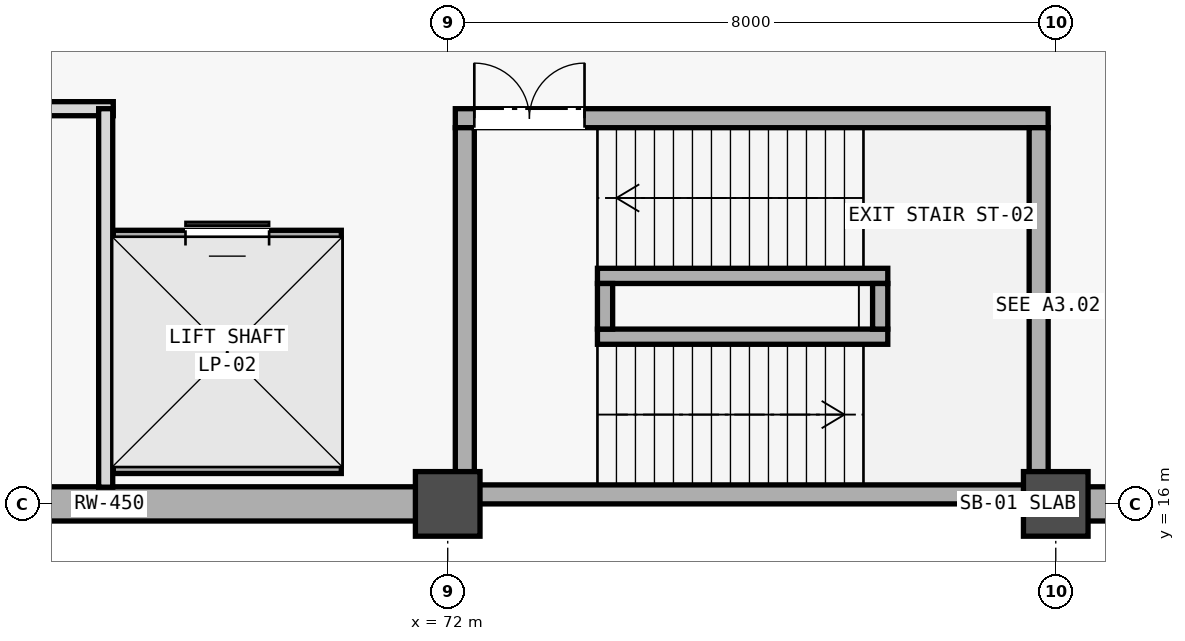
"""IFC4 building model, lengths in metres.
Left out: names, types, materials, properties, quantities, classifications, styles, units other than length and angle.
Written with IfcOpenShell. Run it as: python <this file> out.ifc"""

import sys

from ifc_helpers import new_model, si_unit, direction, frame, frame_2d, origin, origin_2d, place, context, subcontext, project, spatial, rectangle, extrude, element, fill, save


model = new_model("IFC4")
c1 = context("Model", 3, precision=1e-05, world=origin(), true_north=direction((0.0, 1.0)))
c2 = subcontext(c1, "Body", "Model", "MODEL_VIEW")
j1 = project(units=[si_unit("LENGTHUNIT", "METRE"), si_unit("PLANEANGLEUNIT", "RADIAN")], contexts=[c1])
p1 = place(None, origin())
s1 = spatial("IfcSite", under=j1, at=p1, CompositionType="ELEMENT")
p2 = place(p1, origin())
s2 = spatial("IfcBuilding", under=s1, at=p2, CompositionType="ELEMENT")
p3 = place(p2, frame((0.0, 0.0, -4.8)))
s3 = spatial("IfcBuildingStorey", under=s2, at=p3, CompositionType="ELEMENT", Elevation=-4.8)
for number, where, z_axis, x_axis in (
    (1, (72.0, 16.0, 0.0), (0.0, 0.0, 1.0), (1.0, 0.0, 0.0)),
    (2, (80.0, 16.0, 0.0), (0.0, 0.0, 1.0), (1.0, 0.0, 0.0)),
):
    element("IfcColumn", number, at=place(p3, frame(where, z_axis=z_axis, x_axis=x_axis)), inside=s3, PredefinedType="COLUMN", context=c2, shape_type="SweptSolid", body=[
        extrude(rectangle(XDim=0.85, YDim=0.85, at=origin_2d()), origin(), (0.0, 0.0, 1.0), 4.47),
    ])
p4 = place(p3, frame((31.902, 16.0, 0.0), z_axis=(0.0, 0.0, 1.0), x_axis=(1.0, 0.0, 0.0)))
e3 = element("IfcWall", 3, at=p4, inside=s3, PredefinedType="SOLIDWALL", context=c2, shape_type="SweptSolid", body=[
    extrude(rectangle(XDim=40.196, YDim=0.45, at=frame_2d((20.098, 0.0))), origin(), (0.0, 0.0, 1.0), 4.47),
])
p5 = place(p3, frame((79.902, 16.0, 0.0), z_axis=(0.0, 0.0, 1.0), x_axis=(1.0, 0.0, 0.0)))
e4 = element("IfcWall", 4, at=p5, inside=s3, PredefinedType="SOLIDWALL", context=c2, shape_type="SweptSolid", body=[
    extrude(rectangle(XDim=16.098, YDim=0.45, at=frame_2d((8.049, 0.0))), origin(), (0.0, 0.0, 1.0), 4.47),
])
p6 = place(p3, frame((72.1, 16.125, 0.0), z_axis=(0.0, 0.0, 1.0), x_axis=(1.0, 0.0, 0.0)))
e5 = element("IfcWall", 5, at=p6, inside=s3, PredefinedType="SHEAR", context=c2, shape_type="SweptSolid", body=[
    extrude(rectangle(XDim=7.8, YDim=0.25, at=frame_2d((3.9, 0.0))), origin(), (0.0, 0.0, 1.0), 4.8),
])
p7 = place(p3, frame((72.1, 21.075, 0.0), z_axis=(0.0, 0.0, 1.0), x_axis=(1.0, 0.0, 0.0)))
e6 = element("IfcWall", 6, at=p7, inside=s3, PredefinedType="SHEAR", context=c2, shape_type="SweptSolid", body=[
    extrude(rectangle(XDim=7.8, YDim=0.25, at=frame_2d((3.9, 0.0))), origin(), (0.0, 0.0, 1.0), 4.8),
])
p8 = place(p7, frame((0.25, 0.0, 0.0)))
e7 = element("IfcOpeningElement", 7, at=p8, cuts=e6, PredefinedType="OPENING", context=c2, shape_type="SweptSolid", body=[
    extrude(rectangle(XDim=1.45, YDim=2.2, at=frame_2d((0.725, 1.1))), frame((0.0, 0.135, 0.0), z_axis=(0.0, -1.0, 0.0), x_axis=(1.0, 0.0, 0.0)), (0.0, 0.0, 1.0), 0.27),
])
for number, where, z_axis, x_axis in (
    (8, (72.225, 16.25, 0.0), (0.0, 0.0, 1.0), (0.0, 1.0, 0.0)),
    (9, (79.775, 16.25, 0.0), (0.0, 0.0, 1.0), (0.0, 1.0, 0.0)),
):
    element("IfcWall", number, at=place(p3, frame(where, z_axis=z_axis, x_axis=x_axis)), inside=s3, PredefinedType="SHEAR", context=c2, shape_type="SweptSolid", body=[
        extrude(rectangle(XDim=4.7, YDim=0.25, at=frame_2d((2.35, 0.0))), origin(), (0.0, 0.0, 1.0), 4.8),
    ])
for number, where, z_axis, x_axis in (
    (10, (73.97, 18.2, 0.0), (0.0, 0.0, 1.0), (1.0, 0.0, 0.0)),
    (11, (73.97, 19.0, 0.0), (0.0, 0.0, 1.0), (1.0, 0.0, 0.0)),
):
    element("IfcWall", number, at=place(p3, frame(where, z_axis=z_axis, x_axis=x_axis)), inside=s3, PredefinedType="SHEAR", context=c2, shape_type="SweptSolid", body=[
        extrude(rectangle(XDim=3.82, YDim=0.2, at=frame_2d((1.91, 0.0))), origin(), (0.0, 0.0, 1.0), 4.8),
    ])
for number, where, z_axis, x_axis in (
    (12, (74.07, 18.3, 0.0), (0.0, 0.0, 1.0), (0.0, 1.0, 0.0)),
    (13, (77.69, 18.3, 0.0), (0.0, 0.0, 1.0), (0.0, 1.0, 0.0)),
):
    element("IfcWall", number, at=place(p3, frame(where, z_axis=z_axis, x_axis=x_axis)), inside=s3, PredefinedType="SHEAR", context=c2, shape_type="SweptSolid", body=[
        extrude(rectangle(XDim=0.6, YDim=0.2, at=frame_2d((0.3, 0.0))), origin(), (0.0, 0.0, 1.0), 4.8),
    ])
p9 = place(p3, frame((67.6, 16.5, 0.0), z_axis=(0.0, 0.0, 1.0), x_axis=(1.0, 0.0, 0.0)))
e14 = element("IfcWall", 14, at=p9, inside=s3, PredefinedType="SHEAR", context=c2, shape_type="SweptSolid", body=[
    extrude(rectangle(XDim=3.0, YDim=0.2, at=frame_2d((1.5, 0.0))), origin(), (0.0, 0.0, 1.0), 4.8),
])
p10 = place(p3, frame((67.6, 19.5, 0.0), z_axis=(0.0, 0.0, 1.0), x_axis=(1.0, 0.0, 0.0)))
e15 = element("IfcWall", 15, at=p10, inside=s3, PredefinedType="SHEAR", context=c2, shape_type="SweptSolid", body=[
    extrude(rectangle(XDim=3.0, YDim=0.2, at=frame_2d((1.5, 0.0))), origin(), (0.0, 0.0, 1.0), 4.8),
])
p11 = place(p10, frame((0.95, 0.0, 0.0)))
e16 = element("IfcOpeningElement", 16, at=p11, cuts=e15, PredefinedType="OPENING", context=c2, shape_type="SweptSolid", body=[
    extrude(rectangle(XDim=1.1, YDim=2.2, at=frame_2d((0.55, 1.1))), frame((0.0, 0.11, 0.0), z_axis=(0.0, -1.0, 0.0), x_axis=(1.0, 0.0, 0.0)), (0.0, 0.0, 1.0), 0.22),
])
for number, where, z_axis, x_axis in (
    (17, (67.7, 16.6, 0.0), (0.0, 0.0, 1.0), (0.0, 1.0, 0.0)),
    (18, (70.5, 16.6, 0.0), (0.0, 0.0, 1.0), (0.0, 1.0, 0.0)),
):
    element("IfcWall", number, at=place(p3, frame(where, z_axis=z_axis, x_axis=x_axis)), inside=s3, PredefinedType="SHEAR", context=c2, shape_type="SweptSolid", body=[
        extrude(rectangle(XDim=2.8, YDim=0.2, at=frame_2d((1.4, 0.0))), origin(), (0.0, 0.0, 1.0), 4.8),
    ])
p12 = place(p3, frame((36.4, 21.2, 0.0), z_axis=(0.0, 0.0, 1.0), x_axis=(1.0, 0.0, 0.0)))
e19 = element("IfcWall", 19, at=p12, inside=s3, PredefinedType="STANDARD", context=c2, shape_type="SweptSolid", body=[
    extrude(rectangle(XDim=31.2, YDim=0.185, at=frame_2d((15.6, 0.0))), origin(), (0.0, 0.0, 1.0), 3.75),
])
p13 = place(p12, frame((14.4, 0.0, 0.0)))
e20 = element("IfcOpeningElement", 20, at=p13, cuts=e19, PredefinedType="OPENING", context=c2, shape_type="SweptSolid", body=[
    extrude(rectangle(XDim=1.6, YDim=2.3, at=frame_2d((0.8, 1.15))), frame((0.0, 0.103, 0.0), z_axis=(0.0, -1.0, 0.0), x_axis=(1.0, 0.0, 0.0)), (0.0, 0.0, 1.0), 0.205),
])
p14 = place(p3, frame((67.5, 16.22, 0.0), z_axis=(0.0, 0.0, 1.0), x_axis=(0.0, 1.0, 0.0)))
e21 = element("IfcWall", 21, at=p14, inside=s3, PredefinedType="STANDARD", context=c2, shape_type="SweptSolid", body=[
    extrude(rectangle(XDim=4.98, YDim=0.185, at=frame_2d((2.49, 0.0))), origin(), (0.0, 0.0, 1.0), 3.65),
])
p15 = place(p8, origin())
e22 = element("IfcDoor", 22, at=p15, inside=s3, OperationType="DOUBLE_DOOR_SINGLE_SWING", PredefinedType="DOOR", context=c2, shape_type="SweptSolid", body=[
    extrude(rectangle(XDim=1.45, YDim=2.2, at=frame_2d((0.725, 1.1))), frame((0.0, 0.025, 0.0), z_axis=(0.0, -1.0, 0.0), x_axis=(1.0, 0.0, 0.0)), (0.0, 0.0, 1.0), 0.05),
])
fill(e7, e22)
p16 = place(p11, origin())
e23 = element("IfcDoor", 23, at=p16, inside=s3, OperationType="SLIDING_TO_LEFT", PredefinedType="DOOR", context=c2, shape_type="SweptSolid", body=[
    extrude(rectangle(XDim=1.1, YDim=2.2, at=frame_2d((0.55, 1.1))), frame((0.0, 0.025, 0.0), z_axis=(0.0, -1.0, 0.0), x_axis=(1.0, 0.0, 0.0)), (0.0, 0.0, 1.0), 0.05),
])
fill(e16, e23)
save(model, sys.argv[1])
